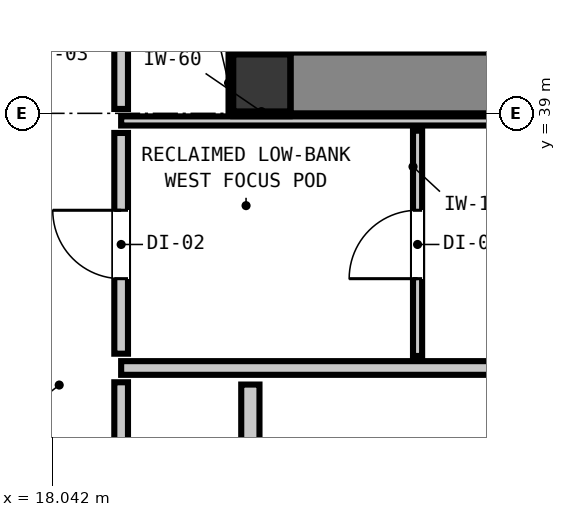
"""IFC4 building model, lengths in metres.
Left out: names, types, materials, properties, quantities, classifications, styles, units other than length and angle.
Written with IfcOpenShell. Run it as: python <this file> out.ifc"""

import sys

from ifc_helpers import new_model, si_unit, direction, frame, frame_2d, origin, origin_2d, place, context, subcontext, project, spatial, rectangle, extrude, element, fill, save


model = new_model("IFC4")
c1 = context("Model", 3, precision=1e-05, world=origin(), true_north=direction((0.0, 1.0)))
c2 = subcontext(c1, "Body", "Model", "MODEL_VIEW")
j1 = project(units=[si_unit("LENGTHUNIT", "METRE"), si_unit("PLANEANGLEUNIT", "RADIAN")], contexts=[c1])
p1 = place(None, origin())
s1 = spatial("IfcSite", under=j1, at=p1, CompositionType="ELEMENT")
p2 = place(p1, origin())
s2 = spatial("IfcBuilding", under=s1, at=p2, CompositionType="ELEMENT")
p3 = place(p2, frame((0.0, 0.0, 226.68)))
s3 = spatial("IfcBuildingStorey", under=s2, at=p3, CompositionType="ELEMENT", Elevation=226.68)
p4 = place(p3, frame((20.8, 39.4, 0.0), z_axis=(0.0, 0.0, 1.0), x_axis=(1.0, 0.0, 0.0)))
e1 = element("IfcColumn", 1, at=p4, inside=s3, PredefinedType="COLUMN", context=c2, shape_type="SweptSolid", body=[
    extrude(rectangle(XDim=0.75, YDim=0.75, at=origin_2d()), origin(), (0.0, 0.0, 1.0), 4.6),
])
p5 = place(p3, frame((21.18, 39.4, 0.0), z_axis=(0.0, 0.0, 1.0), x_axis=(1.0, 0.0, 0.0)))
e2 = element("IfcWall", 2, at=p5, inside=s3, PredefinedType="SHEAR", context=c2, shape_type="SweptSolid", body=[
    extrude(rectangle(XDim=7.64, YDim=0.8, at=frame_2d((3.82, 0.0))), origin(), (0.0, 0.0, 1.0), 4.6),
])
p6 = place(p3, frame((18.95, 35.65, 0.0), z_axis=(0.0, 0.0, 1.0), x_axis=(1.0, 0.0, 0.0)))
e3 = element("IfcWall", 3, at=p6, inside=s3, PredefinedType="PARTITIONING", context=c2, shape_type="SweptSolid", body=[
    extrude(rectangle(XDim=11.025, YDim=0.18, at=frame_2d((5.513, 0.0))), origin(), (0.0, 0.0, 1.0), 4.18),
])
p7 = place(p3, frame((18.95, 38.9, 0.0), z_axis=(0.0, 0.0, 1.0), x_axis=(1.0, 0.0, 0.0)))
e4 = element("IfcWall", 4, at=p7, inside=s3, PredefinedType="PARTITIONING", context=c2, shape_type="SweptSolid", body=[
    extrude(rectangle(XDim=11.025, YDim=0.12, at=frame_2d((5.513, 0.0))), origin(), (0.0, 0.0, 1.0), 2.185),
])
p8 = place(p3, frame((20.65, 33.148, 0.0), z_axis=(0.0, 0.0, 1.0), x_axis=(0.0, 1.0, 0.0)))
e5 = element("IfcWall", 5, at=p8, inside=s3, PredefinedType="PARTITIONING", context=c2, shape_type="SweptSolid", body=[
    extrude(rectangle(XDim=2.284, YDim=0.24, at=frame_2d((1.142, 0.0))), origin(), (0.0, 0.0, 1.0), 2.185),
])
p9 = place(p3, frame((18.95, 33.118, 0.0), z_axis=(0.0, 0.0, 1.0), x_axis=(0.0, 1.0, 0.0)))
e6 = element("IfcWall", 6, at=p9, inside=s3, PredefinedType="PARTITIONING", context=c2, shape_type="SweptSolid", body=[
    extrude(rectangle(XDim=2.344, YDim=0.18, at=frame_2d((1.172, 0.0))), origin(), (0.0, 0.0, 1.0), 4.18),
])
p10 = place(p3, frame((18.95, 35.838, 0.0), z_axis=(0.0, 0.0, 1.0), x_axis=(0.0, 1.0, 0.0)))
e7 = element("IfcWall", 7, at=p10, inside=s3, PredefinedType="PARTITIONING", context=c2, shape_type="SweptSolid", body=[
    extrude(rectangle(XDim=2.904, YDim=0.18, at=frame_2d((1.452, 0.0))), origin(), (0.0, 0.0, 1.0), 4.18),
])
p11 = place(p10, frame((0.987, 0.0, 0.0)))
e8 = element("IfcOpeningElement", 8, at=p11, cuts=e7, PredefinedType="OPENING", context=c2, shape_type="SweptSolid", body=[
    extrude(rectangle(XDim=0.9, YDim=2.1, at=frame_2d((0.45, 1.05))), frame((0.0, 0.1, 0.0), z_axis=(0.0, -1.0, 0.0), x_axis=(1.0, 0.0, 0.0)), (0.0, 0.0, 1.0), 0.2),
])
p12 = place(p3, frame((18.95, 39.058, 0.0), z_axis=(0.0, 0.0, 1.0), x_axis=(0.0, 1.0, 0.0)))
e9 = element("IfcWall", 9, at=p12, inside=s3, PredefinedType="PARTITIONING", context=c2, shape_type="SweptSolid", body=[
    extrude(rectangle(XDim=1.004, YDim=0.18, at=frame_2d((0.502, 0.0))), origin(), (0.0, 0.0, 1.0), 4.18),
])
p13 = place(p3, frame((22.85, 35.808, 0.0), z_axis=(0.0, 0.0, 1.0), x_axis=(0.0, 1.0, 0.0)))
e10 = element("IfcWall", 10, at=p13, inside=s3, PredefinedType="PARTITIONING", context=c2, shape_type="SweptSolid", body=[
    extrude(rectangle(XDim=2.964, YDim=0.12, at=frame_2d((1.482, 0.0))), origin(), (0.0, 0.0, 1.0), 4.18),
])
p14 = place(p13, frame((1.017, 0.0, 0.0)))
e11 = element("IfcOpeningElement", 11, at=p14, cuts=e10, PredefinedType="OPENING", context=c2, shape_type="SweptSolid", body=[
    extrude(rectangle(XDim=0.9, YDim=2.1, at=frame_2d((0.45, 1.05))), frame((0.0, 0.07, 0.0), z_axis=(0.0, -1.0, 0.0), x_axis=(1.0, 0.0, 0.0)), (0.0, 0.0, 1.0), 0.14),
])
for number, where, z_axis, x_axis in (
    (12, (20.425, 38.993, 0.0), (0.0, 0.0, 1.0), (1.0, 0.0, 0.0)),
    (13, (20.425, 39.807, 0.0), (0.0, 0.0, 1.0), (1.0, 0.0, 0.0)),
):
    element("IfcWall", number, at=place(p3, frame(where, z_axis=z_axis, x_axis=x_axis)), inside=s3, PredefinedType="PARTITIONING", context=c2, shape_type="SweptSolid", body=[
        extrude(rectangle(XDim=0.742, YDim=0.06, at=frame_2d((0.371, 0.0))), origin(), (0.0, 0.0, 1.0), 1.45),
    ])
p15 = place(p3, frame((20.393, 39.025, 0.0), z_axis=(0.0, 0.0, 1.0), x_axis=(0.0, 1.0, 0.0)))
e14 = element("IfcWall", 14, at=p15, inside=s3, PredefinedType="PARTITIONING", context=c2, shape_type="SweptSolid", body=[
    extrude(rectangle(XDim=0.75, YDim=0.06, at=frame_2d((0.375, 0.0))), origin(), (0.0, 0.0, 1.0), 1.45),
])
p16 = place(p11, origin())
e15 = element("IfcDoor", 15, at=p16, inside=s3, OperationType="SINGLE_SWING_RIGHT", PredefinedType="DOOR", context=c2, shape_type="SweptSolid", body=[
    extrude(rectangle(XDim=0.9, YDim=2.1, at=frame_2d((0.45, 1.05))), frame((0.0, 0.025, 0.0), z_axis=(0.0, -1.0, 0.0), x_axis=(1.0, 0.0, 0.0)), (0.0, 0.0, 1.0), 0.05),
])
fill(e8, e15)
p17 = place(p14, origin())
e16 = element("IfcDoor", 16, at=p17, inside=s3, OperationType="SINGLE_SWING_LEFT", PredefinedType="DOOR", context=c2, shape_type="SweptSolid", body=[
    extrude(rectangle(XDim=0.9, YDim=2.1, at=frame_2d((0.45, 1.05))), frame((0.0, 0.025, 0.0), z_axis=(0.0, -1.0, 0.0), x_axis=(1.0, 0.0, 0.0)), (0.0, 0.0, 1.0), 0.05),
])
fill(e11, e16)
save(model, sys.argv[1])
